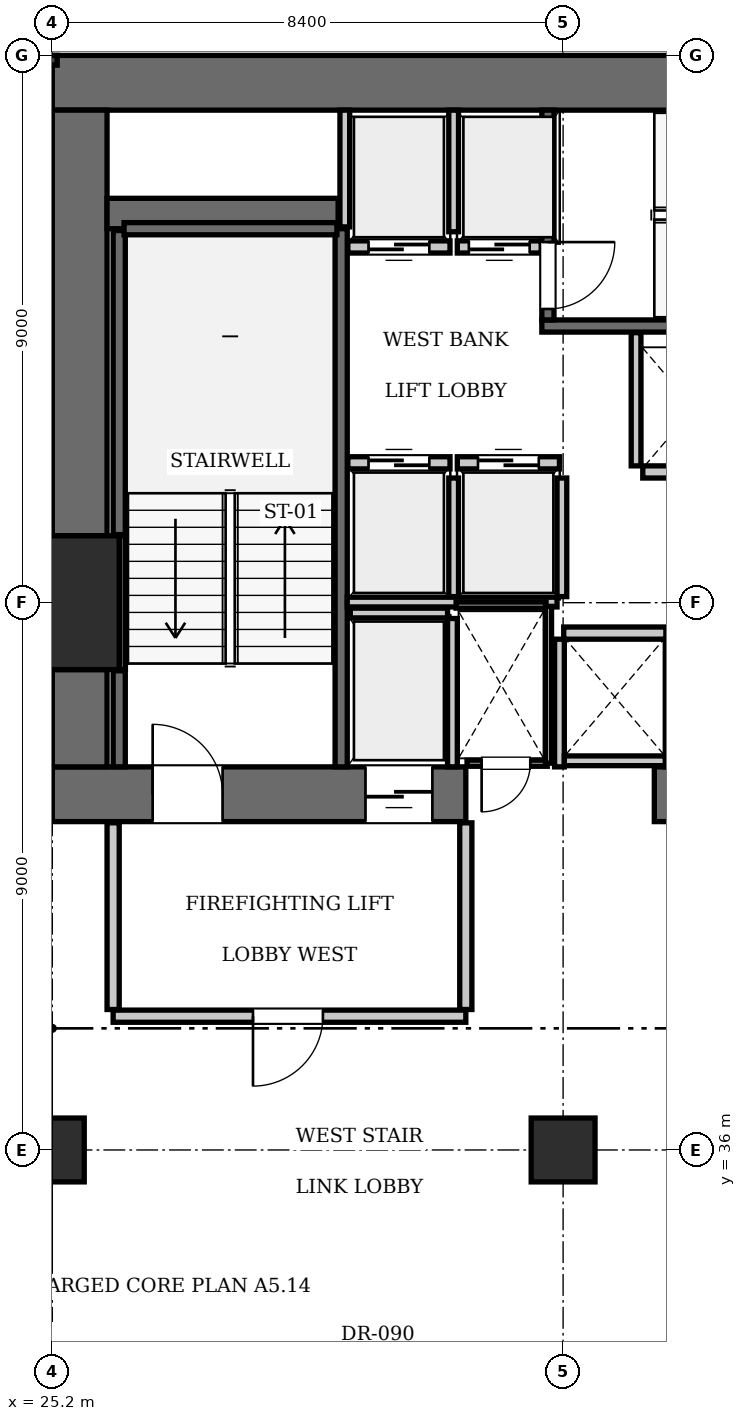
"""IFC4 building model, lengths in metres.
Left out: names, types, materials, properties, quantities, classifications, styles, units other than length and angle.
Written with IfcOpenShell. Run it as: python <this file> out.ifc"""

import sys

from ifc_helpers import new_model, si_unit, direction, frame, frame_2d, origin, origin_2d, place, context, subcontext, project, spatial, rectangle, extrude, element, fill, save


model = new_model("IFC4")
c1 = context("Model", 3, precision=1e-05, world=origin(), true_north=direction((0.0, 1.0)))
c2 = subcontext(c1, "Body", "Model", "MODEL_VIEW")
j1 = project(units=[si_unit("LENGTHUNIT", "METRE"), si_unit("PLANEANGLEUNIT", "RADIAN")], contexts=[c1])
p1 = place(None, origin())
s1 = spatial("IfcSite", under=j1, at=p1, CompositionType="ELEMENT")
p2 = place(p1, origin())
s2 = spatial("IfcBuilding", under=s1, at=p2, CompositionType="ELEMENT")
p3 = place(p2, frame((0.0, 0.0, 80.85)))
s3 = spatial("IfcBuildingStorey", under=s2, at=p3, CompositionType="ELEMENT", Elevation=80.85)
p4 = place(p3, frame((25.2, 45.0, 0.0), z_axis=(0.0, 0.0, 1.0), x_axis=(1.0, 0.0, 0.0)))
e1 = element("IfcColumn", 1, at=p4, inside=s3, PredefinedType="COLUMN", context=c2, shape_type="SweptSolid", body=[
    extrude(rectangle(XDim=2.2, YDim=2.2, at=origin_2d()), origin(), (0.0, 0.0, 1.0), 3.85),
])
p5 = place(p3, frame((25.2, 53.55, 0.0), z_axis=(0.0, 0.0, 1.0), x_axis=(1.0, 0.0, 0.0)))
e2 = element("IfcWall", 2, at=p5, inside=s3, PredefinedType="SHEAR", context=c2, shape_type="SweptSolid", body=[
    extrude(rectangle(XDim=25.2, YDim=0.9, at=frame_2d((12.6, 0.0))), origin(), (0.0, 0.0, 1.0), 3.85),
])
p6 = place(p3, frame((25.2, 41.85, 0.0), z_axis=(0.0, 0.0, 1.0), x_axis=(1.0, 0.0, 0.0)))
e3 = element("IfcWall", 3, at=p6, inside=s3, PredefinedType="SHEAR", context=c2, shape_type="SweptSolid", body=[
    extrude(rectangle(XDim=6.8, YDim=0.9, at=frame_2d((3.4, 0.0))), origin(), (0.0, 0.0, 1.0), 3.85),
])
p7 = place(p6, frame((1.65, 0.0, 0.0)))
e4 = element("IfcOpeningElement", 4, at=p7, cuts=e3, PredefinedType="OPENING", context=c2, shape_type="SweptSolid", body=[
    extrude(rectangle(XDim=1.15, YDim=2.15, at=frame_2d((0.575, 1.075))), frame((0.0, 0.46, 0.0), z_axis=(0.0, -1.0, 0.0), x_axis=(1.0, 0.0, 0.0)), (0.0, 0.0, 1.0), 0.92),
])
p8 = place(p6, frame((5.15, 0.0, 0.0)))
e5 = element("IfcOpeningElement", 5, at=p8, cuts=e3, PredefinedType="OPENING", context=c2, shape_type="SweptSolid", body=[
    extrude(rectangle(XDim=1.1, YDim=2.2, at=frame_2d((0.55, 1.1))), frame((0.0, 0.46, 0.0), z_axis=(0.0, -1.0, 0.0), x_axis=(1.0, 0.0, 0.0)), (0.0, 0.0, 1.0), 0.92),
])
p9 = place(p3, frame((35.1, 41.85, 0.0), z_axis=(0.0, 0.0, 1.0), x_axis=(1.0, 0.0, 0.0)))
e6 = element("IfcWall", 6, at=p9, inside=s3, PredefinedType="SHEAR", context=c2, shape_type="SweptSolid", body=[
    extrude(rectangle(XDim=5.4, YDim=0.9, at=frame_2d((2.7, 0.0))), origin(), (0.0, 0.0, 1.0), 3.85),
])
p10 = place(p3, frame((25.65, 42.3, 0.0), z_axis=(0.0, 0.0, 1.0), x_axis=(0.0, 1.0, 0.0)))
e7 = element("IfcWall", 7, at=p10, inside=s3, PredefinedType="SHEAR", context=c2, shape_type="SweptSolid", body=[
    extrude(rectangle(XDim=1.6, YDim=0.9, at=frame_2d((0.8, 0.0))), origin(), (0.0, 0.0, 1.0), 3.85),
])
p11 = place(p3, frame((25.65, 46.1, 0.0), z_axis=(0.0, 0.0, 1.0), x_axis=(0.0, 1.0, 0.0)))
e8 = element("IfcWall", 8, at=p11, inside=s3, PredefinedType="SHEAR", context=c2, shape_type="SweptSolid", body=[
    extrude(rectangle(XDim=7.0, YDim=0.9, at=frame_2d((3.5, 0.0))), origin(), (0.0, 0.0, 1.0), 3.85),
])
p12 = place(p3, frame((26.1, 51.4, 0.0), z_axis=(0.0, 0.0, 1.0), x_axis=(1.0, 0.0, 0.0)))
e9 = element("IfcWall", 9, at=p12, inside=s3, PredefinedType="SHEAR", context=c2, shape_type="SweptSolid", body=[
    extrude(rectangle(XDim=3.8, YDim=0.5, at=frame_2d((1.9, 0.0))), origin(), (0.0, 0.0, 1.0), 3.85),
])
for number, where, z_axis, x_axis in (
    (10, (25.2, 36.0, 0.0), (0.0, 0.0, 1.0), (1.0, 0.0, 0.0)),
    (11, (33.6, 36.0, 0.0), (0.0, 0.0, 1.0), (1.0, 0.0, 0.0)),
):
    element("IfcColumn", number, at=place(p3, frame(where, z_axis=z_axis, x_axis=x_axis)), inside=s3, PredefinedType="COLUMN", context=c2, shape_type="SweptSolid", body=[
        extrude(rectangle(XDim=1.05, YDim=1.05, at=origin_2d()), origin(), (0.0, 0.0, 1.0), 3.85),
    ])
p13 = place(p3, frame((29.95, 42.3, 0.0), z_axis=(0.0, 0.0, 1.0), x_axis=(0.0, 1.0, 0.0)))
e12 = element("IfcWall", 12, at=p13, inside=s3, PredefinedType="SOLIDWALL", context=c2, shape_type="SweptSolid", body=[
    extrude(rectangle(XDim=8.85, YDim=0.2, at=frame_2d((4.425, 0.0))), origin(), (0.0, 0.0, 1.0), 3.61),
])
p14 = place(p3, frame((26.3, 42.3, 0.0), z_axis=(0.0, 0.0, 1.0), x_axis=(0.0, 1.0, 0.0)))
e13 = element("IfcWall", 13, at=p14, inside=s3, PredefinedType="SOLIDWALL", context=c2, shape_type="SweptSolid", body=[
    extrude(rectangle(XDim=1.58, YDim=0.2, at=frame_2d((0.79, 0.0))), origin(), (0.0, 0.0, 1.0), 3.61),
])
p15 = place(p3, frame((26.3, 46.12, 0.0), z_axis=(0.0, 0.0, 1.0), x_axis=(0.0, 1.0, 0.0)))
e14 = element("IfcWall", 14, at=p15, inside=s3, PredefinedType="SOLIDWALL", context=c2, shape_type="SweptSolid", body=[
    extrude(rectangle(XDim=5.0, YDim=0.2, at=frame_2d((2.5, 0.0))), origin(), (0.0, 0.0, 1.0), 3.61),
])
p16 = place(p3, frame((26.38, 51.15, 0.0), z_axis=(0.0, 0.0, 1.0), x_axis=(1.0, 0.0, 0.0)))
e15 = element("IfcWall", 15, at=p16, inside=s3, PredefinedType="SOLIDWALL", context=c2, shape_type="SweptSolid", body=[
    extrude(rectangle(XDim=3.5, YDim=0.2, at=frame_2d((1.75, 0.0))), origin(), (0.0, 0.0, 1.0), 3.61),
])
p17 = place(p3, frame((26.352, 43.9, 0.0), z_axis=(0.0, 0.0, 1.0), x_axis=(0.0, 1.0, 0.0)))
e16 = element("IfcWall", 16, at=p17, inside=s3, PredefinedType="SOLIDWALL", context=c2, shape_type="SweptSolid", body=[
    extrude(rectangle(XDim=2.2, YDim=0.1, at=frame_2d((1.1, 0.0))), origin(), (0.0, 0.0, 1.0), 3.61),
])
p18 = place(p3, frame((33.25, 49.55, 0.0), z_axis=(0.0, 0.0, 1.0), x_axis=(1.0, 0.0, 0.0)))
e17 = element("IfcWall", 17, at=p18, inside=s3, PredefinedType="SOLIDWALL", context=c2, shape_type="SweptSolid", body=[
    extrude(rectangle(XDim=9.1, YDim=0.2, at=frame_2d((4.55, 0.0))), origin(), (0.0, 0.0, 1.0), 3.61),
])
p19 = place(p3, frame((33.35, 49.65, 0.0), z_axis=(0.0, 0.0, 1.0), x_axis=(0.0, 1.0, 0.0)))
e18 = element("IfcWall", 18, at=p19, inside=s3, PredefinedType="SOLIDWALL", context=c2, shape_type="SweptSolid", body=[
    extrude(rectangle(XDim=3.45, YDim=0.2, at=frame_2d((1.725, 0.0))), origin(), (0.0, 0.0, 1.0), 3.61),
])
p20 = place(p19, frame((0.18, 0.0, 0.0)))
e19 = element("IfcOpeningElement", 19, at=p20, cuts=e18, PredefinedType="OPENING", context=c2, shape_type="SweptSolid", body=[
    extrude(rectangle(XDim=1.1, YDim=2.15, at=frame_2d((0.55, 1.075))), frame((0.0, 0.11, 0.0), z_axis=(0.0, -1.0, 0.0), x_axis=(1.0, 0.0, 0.0)), (0.0, 0.0, 1.0), 0.22),
])
p21 = place(p3, frame((30.06, 47.3, 0.0), z_axis=(0.0, 0.0, 1.0), x_axis=(1.0, 0.0, 0.0)))
e20 = element("IfcWall", 20, at=p21, inside=s3, PredefinedType="SOLIDWALL", context=c2, shape_type="SweptSolid", body=[
    extrude(rectangle(XDim=1.68, YDim=0.2, at=frame_2d((0.84, 0.0))), origin(), (0.0, 0.0, 1.0), 3.61),
])
p22 = place(p21, frame((0.34, 0.0, 0.0)))
e21 = element("IfcOpeningElement", 21, at=p22, cuts=e20, PredefinedType="OPENING", context=c2, shape_type="SweptSolid", body=[
    extrude(rectangle(XDim=1.0, YDim=2.15, at=frame_2d((0.5, 1.075))), frame((0.0, 0.11, 0.0), z_axis=(0.0, -1.0, 0.0), x_axis=(1.0, 0.0, 0.0)), (0.0, 0.0, 1.0), 0.22),
])
p23 = place(p3, frame((31.86, 47.3, 0.0), z_axis=(0.0, 0.0, 1.0), x_axis=(1.0, 0.0, 0.0)))
e22 = element("IfcWall", 22, at=p23, inside=s3, PredefinedType="SOLIDWALL", context=c2, shape_type="SweptSolid", body=[
    extrude(rectangle(XDim=1.68, YDim=0.2, at=frame_2d((0.84, 0.0))), origin(), (0.0, 0.0, 1.0), 3.61),
])
p24 = place(p23, frame((0.34, 0.0, 0.0)))
e23 = element("IfcOpeningElement", 23, at=p24, cuts=e22, PredefinedType="OPENING", context=c2, shape_type="SweptSolid", body=[
    extrude(rectangle(XDim=1.0, YDim=2.15, at=frame_2d((0.5, 1.075))), frame((0.0, 0.11, 0.0), z_axis=(0.0, -1.0, 0.0), x_axis=(1.0, 0.0, 0.0)), (0.0, 0.0, 1.0), 0.22),
])
p25 = place(p3, frame((30.06, 50.85, 0.0), z_axis=(0.0, 0.0, 1.0), x_axis=(1.0, 0.0, 0.0)))
e24 = element("IfcWall", 24, at=p25, inside=s3, PredefinedType="SOLIDWALL", context=c2, shape_type="SweptSolid", body=[
    extrude(rectangle(XDim=1.68, YDim=0.2, at=frame_2d((0.84, 0.0))), origin(), (0.0, 0.0, 1.0), 3.61),
])
p26 = place(p25, frame((0.34, 0.0, 0.0)))
e25 = element("IfcOpeningElement", 25, at=p26, cuts=e24, PredefinedType="OPENING", context=c2, shape_type="SweptSolid", body=[
    extrude(rectangle(XDim=1.0, YDim=2.15, at=frame_2d((0.5, 1.075))), frame((0.0, 0.11, 0.0), z_axis=(0.0, -1.0, 0.0), x_axis=(1.0, 0.0, 0.0)), (0.0, 0.0, 1.0), 0.22),
])
p27 = place(p3, frame((31.86, 50.85, 0.0), z_axis=(0.0, 0.0, 1.0), x_axis=(1.0, 0.0, 0.0)))
e26 = element("IfcWall", 26, at=p27, inside=s3, PredefinedType="SOLIDWALL", context=c2, shape_type="SweptSolid", body=[
    extrude(rectangle(XDim=1.38, YDim=0.2, at=frame_2d((0.69, 0.0))), origin(), (0.0, 0.0, 1.0), 3.61),
])
p28 = place(p27, frame((0.19, 0.0, 0.0)))
e27 = element("IfcOpeningElement", 27, at=p28, cuts=e26, PredefinedType="OPENING", context=c2, shape_type="SweptSolid", body=[
    extrude(rectangle(XDim=1.0, YDim=2.15, at=frame_2d((0.5, 1.075))), frame((0.0, 0.11, 0.0), z_axis=(0.0, -1.0, 0.0), x_axis=(1.0, 0.0, 0.0)), (0.0, 0.0, 1.0), 0.22),
])
p29 = place(p3, frame((34.91, 47.15, 0.0), z_axis=(0.0, 0.0, 1.0), x_axis=(1.0, 0.0, 0.0)))
e28 = element("IfcWall", 28, at=p29, inside=s3, PredefinedType="SOLIDWALL", context=c2, shape_type="SweptSolid", body=[
    extrude(rectangle(XDim=1.68, YDim=0.2, at=frame_2d((0.84, 0.0))), origin(), (0.0, 0.0, 1.0), 3.61),
])
p30 = place(p3, frame((33.61, 44.5, 0.0), z_axis=(0.0, 0.0, 1.0), x_axis=(1.0, 0.0, 0.0)))
e29 = element("IfcWall", 29, at=p30, inside=s3, PredefinedType="SOLIDWALL", context=c2, shape_type="SweptSolid", body=[
    extrude(rectangle(XDim=1.68, YDim=0.2, at=frame_2d((0.84, 0.0))), origin(), (0.0, 0.0, 1.0), 3.61),
])
p31 = place(p3, frame((30.1, 44.83, 0.0), z_axis=(0.0, 0.0, 1.0), x_axis=(1.0, 0.0, 0.0)))
e30 = element("IfcWall", 30, at=p31, inside=s3, PredefinedType="SOLIDWALL", context=c2, shape_type="SweptSolid", body=[
    extrude(rectangle(XDim=1.6, YDim=0.16, at=frame_2d((0.8, 0.0))), origin(), (0.0, 0.0, 1.0), 3.61),
])
p32 = place(p3, frame((31.78, 42.3, 0.0), z_axis=(0.0, 0.0, 1.0), x_axis=(0.0, 1.0, 0.0)))
e31 = element("IfcWall", 31, at=p32, inside=s3, PredefinedType="SOLIDWALL", context=c2, shape_type="SweptSolid", body=[
    extrude(rectangle(XDim=2.44, YDim=0.16, at=frame_2d((1.22, 0.0))), origin(), (0.0, 0.0, 1.0), 3.61),
])
for number, where, z_axis, x_axis in (
    (32, (31.8, 45.1, 0.0), (0.0, 0.0, 1.0), (0.0, 1.0, 0.0)),
    (33, (33.58, 45.1, 0.0), (0.0, 0.0, 1.0), (0.0, 1.0, 0.0)),
):
    element("IfcWall", number, at=place(p3, frame(where, z_axis=z_axis, x_axis=x_axis)), inside=s3, PredefinedType="SOLIDWALL", context=c2, shape_type="SweptSolid", body=[
        extrude(rectangle(XDim=1.95, YDim=0.16, at=frame_2d((0.975, 0.0))), origin(), (0.0, 0.0, 1.0), 3.61),
    ])
p33 = place(p3, frame((30.05, 45.01, 0.0), z_axis=(0.0, 0.0, 1.0), x_axis=(1.0, 0.0, 0.0)))
e34 = element("IfcWall", 34, at=p33, inside=s3, PredefinedType="SOLIDWALL", context=c2, shape_type="SweptSolid", body=[
    extrude(rectangle(XDim=3.45, YDim=0.16, at=frame_2d((1.725, 0.0))), origin(), (0.0, 0.0, 1.0), 3.61),
])
p34 = place(p3, frame((30.01, 51.18, 0.0), z_axis=(0.0, 0.0, 1.0), x_axis=(0.0, 1.0, 0.0)))
e35 = element("IfcWall", 35, at=p34, inside=s3, PredefinedType="SOLIDWALL", context=c2, shape_type="SweptSolid", body=[
    extrude(rectangle(XDim=1.92, YDim=0.16, at=frame_2d((0.96, 0.0))), origin(), (0.0, 0.0, 1.0), 3.61),
])
p35 = place(p3, frame((31.8, 51.1, 0.0), z_axis=(0.0, 0.0, 1.0), x_axis=(0.0, 1.0, 0.0)))
e36 = element("IfcWall", 36, at=p35, inside=s3, PredefinedType="SOLIDWALL", context=c2, shape_type="SweptSolid", body=[
    extrude(rectangle(XDim=2.0, YDim=0.16, at=frame_2d((1.0, 0.0))), origin(), (0.0, 0.0, 1.0), 3.61),
])
p36 = place(p3, frame((34.8, 47.25, 0.0), z_axis=(0.0, 0.0, 1.0), x_axis=(0.0, 1.0, 0.0)))
e37 = element("IfcWall", 37, at=p36, inside=s3, PredefinedType="SOLIDWALL", context=c2, shape_type="SweptSolid", body=[
    extrude(rectangle(XDim=2.19, YDim=0.16, at=frame_2d((1.095, 0.0))), origin(), (0.0, 0.0, 1.0), 3.61),
])
for number, where, z_axis, x_axis in (
    (38, (33.54, 42.3, 0.0), (0.0, 0.0, 1.0), (0.0, 1.0, 0.0)),
    (39, (35.36, 42.3, 0.0), (0.0, 0.0, 1.0), (0.0, 1.0, 0.0)),
):
    element("IfcWall", number, at=place(p3, frame(where, z_axis=z_axis, x_axis=x_axis)), inside=s3, PredefinedType="SOLIDWALL", context=c2, shape_type="SweptSolid", body=[
        extrude(rectangle(XDim=2.1, YDim=0.16, at=frame_2d((1.05, 0.0))), origin(), (0.0, 0.0, 1.0), 3.61),
    ])
p37 = place(p3, frame((33.62, 42.4, 0.0), z_axis=(0.0, 0.0, 1.0), x_axis=(1.0, 0.0, 0.0)))
e40 = element("IfcWall", 40, at=p37, inside=s3, PredefinedType="SOLIDWALL", context=c2, shape_type="SweptSolid", body=[
    extrude(rectangle(XDim=1.66, YDim=0.16, at=frame_2d((0.83, 0.0))), origin(), (0.0, 0.0, 1.0), 3.61),
])
p38 = place(p3, frame((26.2, 38.2, 0.0), z_axis=(0.0, 0.0, 1.0), x_axis=(1.0, 0.0, 0.0)))
e41 = element("IfcWall", 41, at=p38, inside=s3, PredefinedType="PARTITIONING", context=c2, shape_type="SweptSolid", body=[
    extrude(rectangle(XDim=5.8, YDim=0.2, at=frame_2d((2.9, 0.0))), origin(), (0.0, 0.0, 1.0), 3.61),
])
p39 = place(p38, frame((2.3, 0.0, 0.0)))
e42 = element("IfcOpeningElement", 42, at=p39, cuts=e41, PredefinedType="OPENING", context=c2, shape_type="SweptSolid", body=[
    extrude(rectangle(XDim=1.15, YDim=2.15, at=frame_2d((0.575, 1.075))), frame((0.0, 0.11, 0.0), z_axis=(0.0, -1.0, 0.0), x_axis=(1.0, 0.0, 0.0)), (0.0, 0.0, 1.0), 0.22),
])
for number, where, z_axis, x_axis in (
    (43, (26.2, 38.31, 0.0), (0.0, 0.0, 1.0), (0.0, 1.0, 0.0)),
    (44, (32.0, 38.31, 0.0), (0.0, 0.0, 1.0), (0.0, 1.0, 0.0)),
):
    element("IfcWall", number, at=place(p3, frame(where, z_axis=z_axis, x_axis=x_axis)), inside=s3, PredefinedType="PARTITIONING", context=c2, shape_type="SweptSolid", body=[
        extrude(rectangle(XDim=3.07, YDim=0.2, at=frame_2d((1.535, 0.0))), origin(), (0.0, 0.0, 1.0), 3.61),
    ])
p40 = place(p3, frame((32.02, 42.36, 0.0), z_axis=(0.0, 0.0, 1.0), x_axis=(1.0, 0.0, 0.0)))
e45 = element("IfcWall", 45, at=p40, inside=s3, PredefinedType="PARTITIONING", context=c2, shape_type="SweptSolid", body=[
    extrude(rectangle(XDim=1.32, YDim=0.1, at=frame_2d((0.66, 0.0))), origin(), (0.0, 0.0, 1.0), 3.61),
])
p41 = place(p40, frame((0.24, 0.0, 0.0)))
e46 = element("IfcOpeningElement", 46, at=p41, cuts=e45, PredefinedType="OPENING", context=c2, shape_type="SweptSolid", body=[
    extrude(rectangle(XDim=0.8, YDim=2.05, at=frame_2d((0.4, 1.025))), frame((0.0, 0.06, 0.0), z_axis=(0.0, -1.0, 0.0), x_axis=(1.0, 0.0, 0.0)), (0.0, 0.0, 1.0), 0.12),
])
p42 = place(p3, frame((31.84, 44.96, 0.0), z_axis=(0.0, 0.0, 1.0), x_axis=(1.0, 0.0, 0.0)))
e47 = element("IfcWall", 47, at=p42, inside=s3, PredefinedType="PARTITIONING", context=c2, shape_type="SweptSolid", body=[
    extrude(rectangle(XDim=1.48, YDim=0.1, at=frame_2d((0.74, 0.0))), origin(), (0.0, 0.0, 1.0), 3.61),
])
p43 = place(p3, frame((33.36, 42.36, 0.0), z_axis=(0.0, 0.0, 1.0), x_axis=(0.0, 1.0, 0.0)))
e48 = element("IfcWall", 48, at=p43, inside=s3, PredefinedType="PARTITIONING", context=c2, shape_type="SweptSolid", body=[
    extrude(rectangle(XDim=2.58, YDim=0.1, at=frame_2d((1.29, 0.0))), origin(), (0.0, 0.0, 1.0), 3.61),
])
p44 = place(p7, origin())
e49 = element("IfcDoor", 49, at=p44, inside=s3, OperationType="SINGLE_SWING_LEFT", PredefinedType="DOOR", context=c2, shape_type="SweptSolid", body=[
    extrude(rectangle(XDim=1.15, YDim=2.15, at=frame_2d((0.575, 1.075))), frame((0.0, 0.025, 0.0), z_axis=(0.0, -1.0, 0.0), x_axis=(1.0, 0.0, 0.0)), (0.0, 0.0, 1.0), 0.05),
])
fill(e4, e49)
p45 = place(p20, frame((1.1, 0.0, 0.0), z_axis=(0.0, 0.0, 1.0), x_axis=(-1.0, 0.0, 0.0)))
e50 = element("IfcDoor", 50, at=p45, inside=s3, OperationType="SINGLE_SWING_LEFT", PredefinedType="DOOR", context=c2, shape_type="SweptSolid", body=[
    extrude(rectangle(XDim=1.1, YDim=2.15, at=frame_2d((0.55, 1.075))), frame((0.0, 0.025, 0.0), z_axis=(0.0, -1.0, 0.0), x_axis=(1.0, 0.0, 0.0)), (0.0, 0.0, 1.0), 0.05),
])
fill(e19, e50)
p46 = place(p22, origin())
e51 = element("IfcDoor", 51, at=p46, inside=s3, OperationType="SLIDING_TO_LEFT", PredefinedType="DOOR", context=c2, shape_type="SweptSolid", body=[
    extrude(rectangle(XDim=1.0, YDim=2.15, at=frame_2d((0.5, 1.075))), frame((0.0, 0.025, 0.0), z_axis=(0.0, -1.0, 0.0), x_axis=(1.0, 0.0, 0.0)), (0.0, 0.0, 1.0), 0.05),
])
fill(e21, e51)
p47 = place(p24, origin())
e52 = element("IfcDoor", 52, at=p47, inside=s3, OperationType="SLIDING_TO_LEFT", PredefinedType="DOOR", context=c2, shape_type="SweptSolid", body=[
    extrude(rectangle(XDim=1.0, YDim=2.15, at=frame_2d((0.5, 1.075))), frame((0.0, 0.025, 0.0), z_axis=(0.0, -1.0, 0.0), x_axis=(1.0, 0.0, 0.0)), (0.0, 0.0, 1.0), 0.05),
])
fill(e23, e52)
p48 = place(p26, frame((1.0, 0.0, 0.0), z_axis=(0.0, 0.0, 1.0), x_axis=(-1.0, 0.0, 0.0)))
e53 = element("IfcDoor", 53, at=p48, inside=s3, OperationType="SLIDING_TO_LEFT", PredefinedType="DOOR", context=c2, shape_type="SweptSolid", body=[
    extrude(rectangle(XDim=1.0, YDim=2.15, at=frame_2d((0.5, 1.075))), frame((0.0, 0.025, 0.0), z_axis=(0.0, -1.0, 0.0), x_axis=(1.0, 0.0, 0.0)), (0.0, 0.0, 1.0), 0.05),
])
fill(e25, e53)
p49 = place(p28, frame((1.0, 0.0, 0.0), z_axis=(0.0, 0.0, 1.0), x_axis=(-1.0, 0.0, 0.0)))
e54 = element("IfcDoor", 54, at=p49, inside=s3, OperationType="SLIDING_TO_LEFT", PredefinedType="DOOR", context=c2, shape_type="SweptSolid", body=[
    extrude(rectangle(XDim=1.0, YDim=2.15, at=frame_2d((0.5, 1.075))), frame((0.0, 0.025, 0.0), z_axis=(0.0, -1.0, 0.0), x_axis=(1.0, 0.0, 0.0)), (0.0, 0.0, 1.0), 0.05),
])
fill(e27, e54)
p50 = place(p8, frame((1.1, 0.0, 0.0), z_axis=(0.0, 0.0, 1.0), x_axis=(-1.0, 0.0, 0.0)))
e55 = element("IfcDoor", 55, at=p50, inside=s3, OperationType="SLIDING_TO_LEFT", PredefinedType="DOOR", context=c2, shape_type="SweptSolid", body=[
    extrude(rectangle(XDim=1.1, YDim=2.2, at=frame_2d((0.55, 1.1))), frame((0.0, 0.025, 0.0), z_axis=(0.0, -1.0, 0.0), x_axis=(1.0, 0.0, 0.0)), (0.0, 0.0, 1.0), 0.05),
])
fill(e5, e55)
p51 = place(p39, frame((1.15, 0.0, 0.0), z_axis=(0.0, 0.0, 1.0), x_axis=(-1.0, 0.0, 0.0)))
e56 = element("IfcDoor", 56, at=p51, inside=s3, OperationType="SINGLE_SWING_RIGHT", PredefinedType="DOOR", context=c2, shape_type="SweptSolid", body=[
    extrude(rectangle(XDim=1.15, YDim=2.15, at=frame_2d((0.575, 1.075))), frame((0.0, 0.025, 0.0), z_axis=(0.0, -1.0, 0.0), x_axis=(1.0, 0.0, 0.0)), (0.0, 0.0, 1.0), 0.05),
])
fill(e42, e56)
p52 = place(p41, frame((0.8, 0.0, 0.0), z_axis=(0.0, 0.0, 1.0), x_axis=(-1.0, 0.0, 0.0)))
e57 = element("IfcDoor", 57, at=p52, inside=s3, OperationType="SINGLE_SWING_RIGHT", PredefinedType="DOOR", context=c2, shape_type="SweptSolid", body=[
    extrude(rectangle(XDim=0.8, YDim=2.05, at=frame_2d((0.4, 1.025))), frame((0.0, 0.025, 0.0), z_axis=(0.0, -1.0, 0.0), x_axis=(1.0, 0.0, 0.0)), (0.0, 0.0, 1.0), 0.05),
])
fill(e46, e57)
save(model, sys.argv[1])
